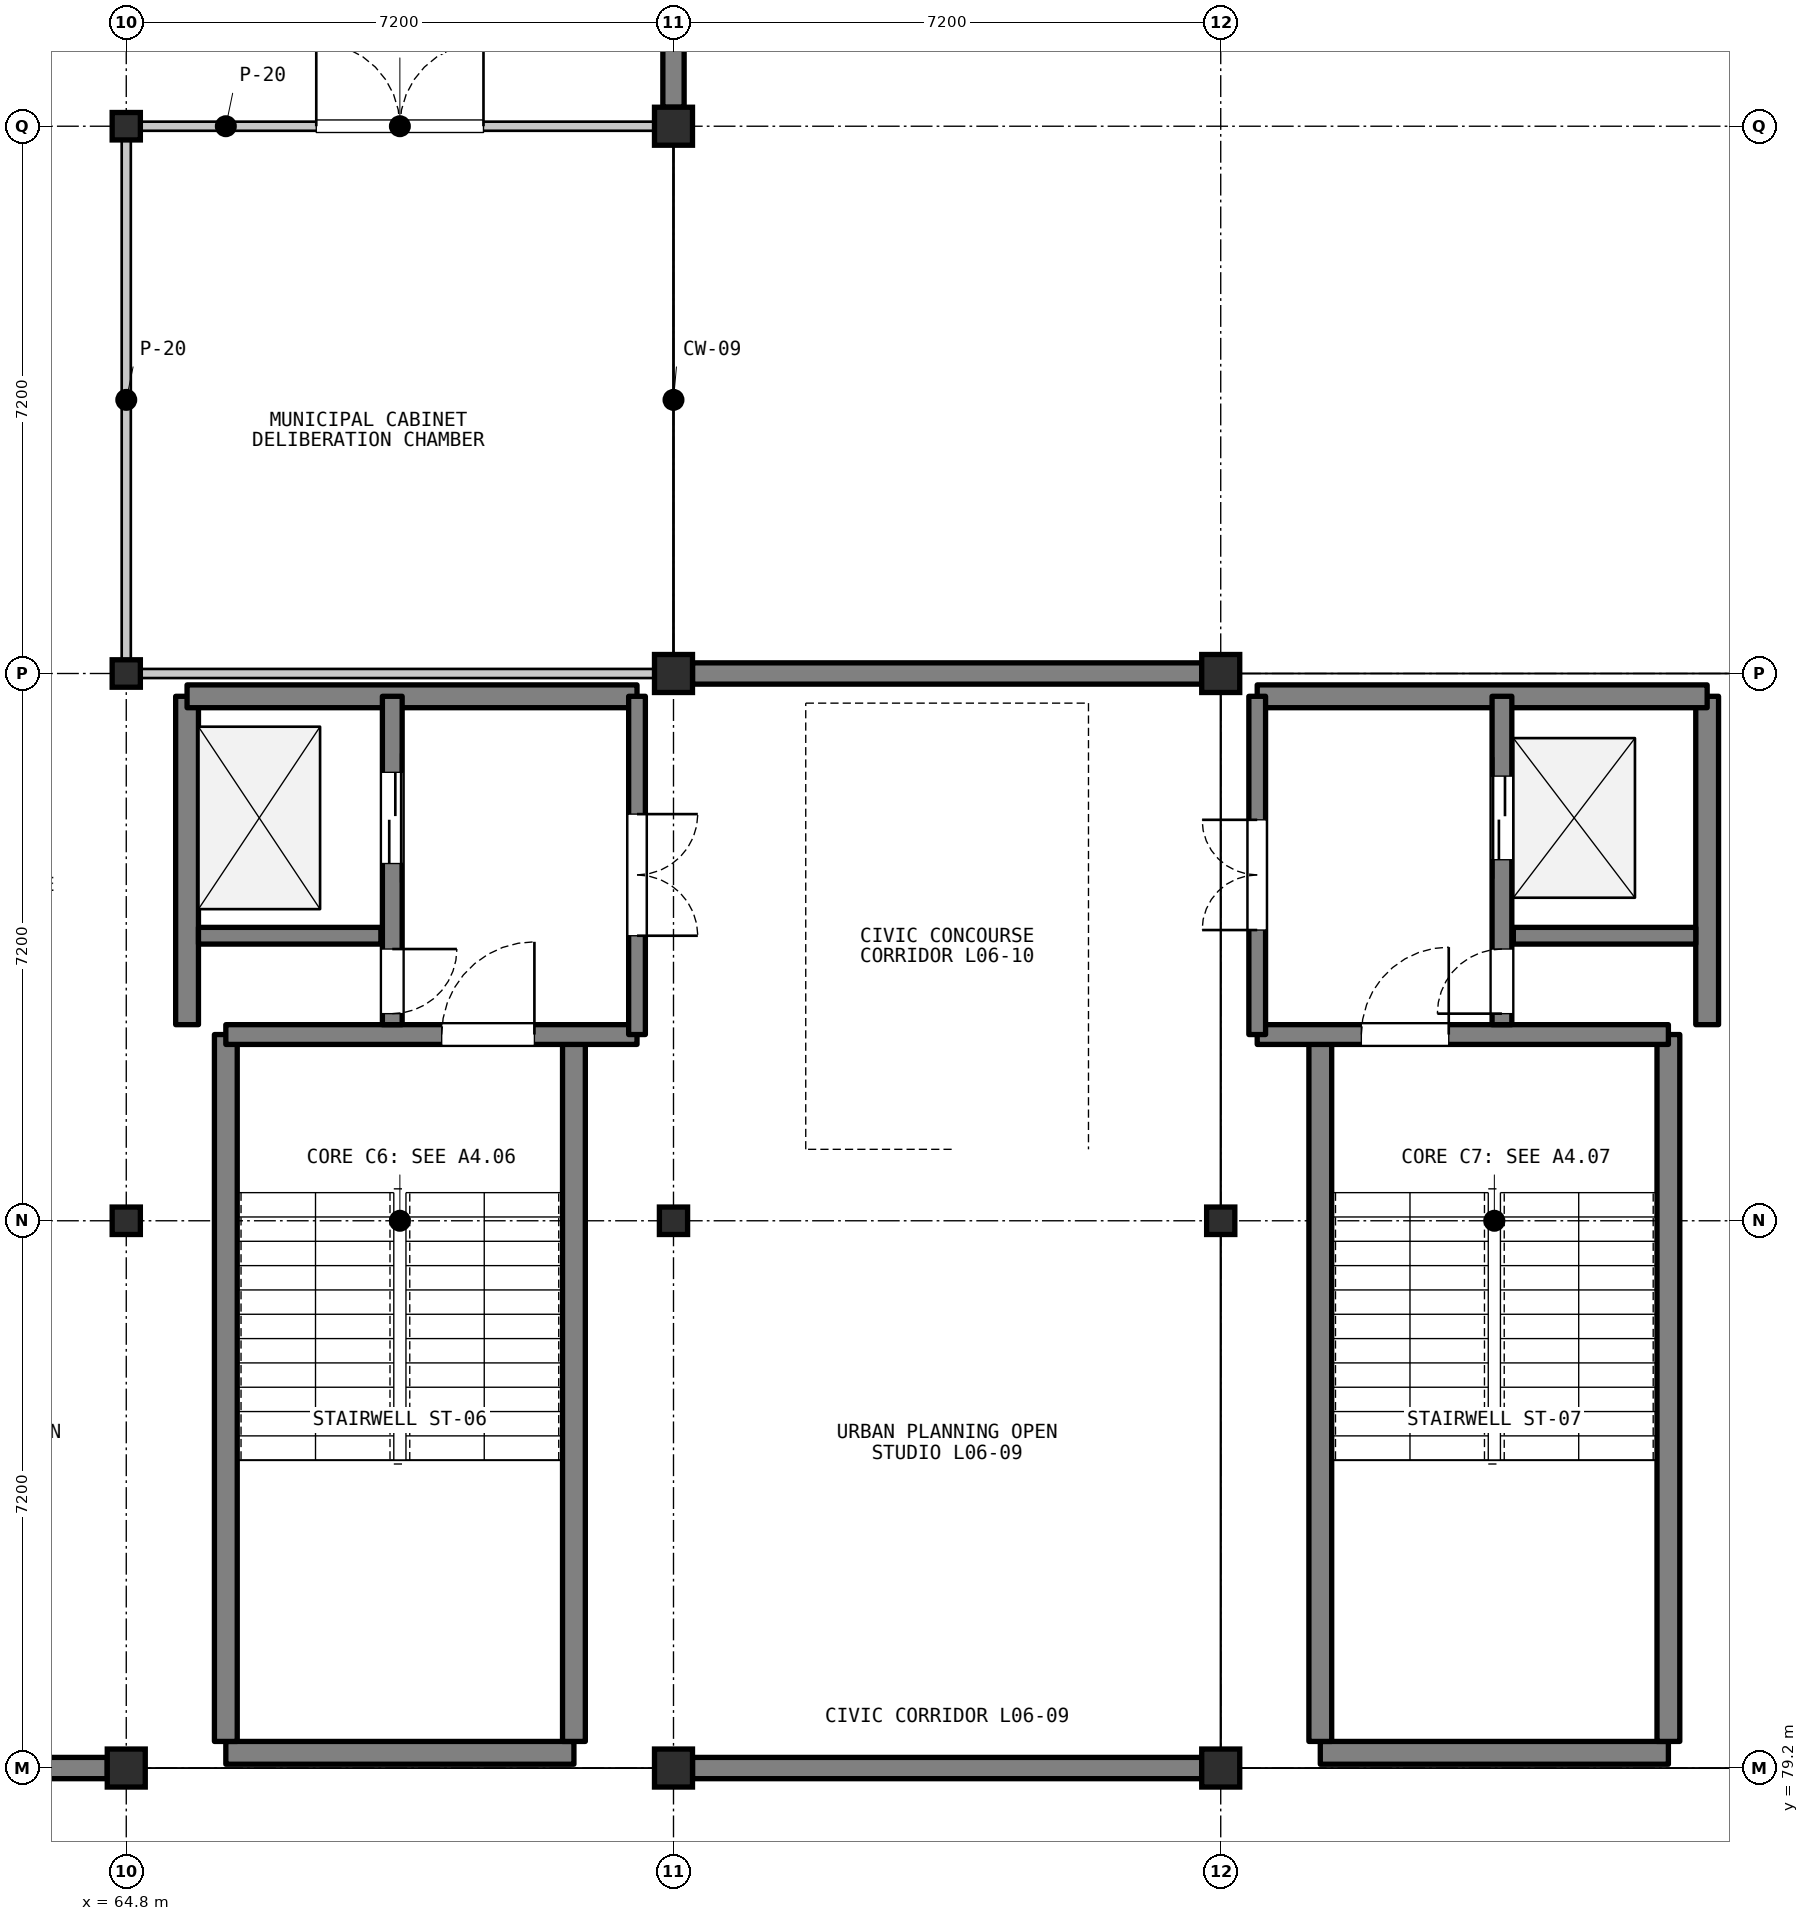
"""IFC4 building model, lengths in metres.
Left out: names, types, materials, properties, quantities, classifications, styles, units other than length and angle.
Written with IfcOpenShell. Run it as: python <this file> out.ifc"""

import sys

from ifc_helpers import new_model, si_unit, direction, frame, frame_2d, origin, origin_2d, place, context, subcontext, project, spatial, rectangle, i_section, extrude, element, fill, save


model = new_model("IFC4")
c1 = context("Model", 3, precision=1e-05, world=origin(), true_north=direction((0.0, 1.0)))
c2 = subcontext(c1, "Body", "Model", "MODEL_VIEW")
j1 = project(units=[si_unit("LENGTHUNIT", "METRE"), si_unit("PLANEANGLEUNIT", "RADIAN")], contexts=[c1])
p1 = place(None, origin())
s1 = spatial("IfcSite", under=j1, at=p1, CompositionType="ELEMENT")
p2 = place(p1, origin())
s2 = spatial("IfcBuilding", under=s1, at=p2, CompositionType="ELEMENT")
p3 = place(p2, frame((0.0, 0.0, 21.9)))
s3 = spatial("IfcBuildingStorey", under=s2, at=p3, CompositionType="ELEMENT", Elevation=21.9)
p4 = place(p3, frame((64.8, 79.2, 0.0), z_axis=(0.0, 0.0, 1.0), x_axis=(1.0, 0.0, 0.0)))
e1 = element("IfcColumn", 1, at=p4, inside=s3, PredefinedType="COLUMN", context=c2, shape_type="SweptSolid", body=[
    extrude(rectangle(XDim=0.5, YDim=0.5, at=origin_2d()), origin(), (0.0, 0.0, 1.0), 3.9),
])
for number, where, z_axis, x_axis in (
    (2, (64.8, 86.4, 0.0), (0.0, 0.0, 1.0), (1.0, 0.0, 0.0)),
    (3, (64.8, 93.6, 0.0), (0.0, 0.0, 1.0), (1.0, 0.0, 0.0)),
    (4, (64.8, 100.8, 0.0), (0.0, 0.0, 1.0), (1.0, 0.0, 0.0)),
):
    element("IfcColumn", number, at=place(p3, frame(where, z_axis=z_axis, x_axis=x_axis)), inside=s3, PredefinedType="COLUMN", context=c2, shape_type="SweptSolid", body=[
        extrude(i_section(OverallWidth=0.371, OverallDepth=0.361, WebThickness=0.012, FlangeThickness=0.02, FilletRadius=0.015, at=origin_2d()), origin(), (0.0, 0.0, 1.0), 3.9),
    ])
p5 = place(p3, frame((72.0, 79.2, 0.0), z_axis=(0.0, 0.0, 1.0), x_axis=(1.0, 0.0, 0.0)))
e5 = element("IfcColumn", 5, at=p5, inside=s3, PredefinedType="COLUMN", context=c2, shape_type="SweptSolid", body=[
    extrude(rectangle(XDim=0.5, YDim=0.5, at=origin_2d()), origin(), (0.0, 0.0, 1.0), 3.9),
])
p6 = place(p3, frame((72.0, 86.4, 0.0), z_axis=(0.0, 0.0, 1.0), x_axis=(1.0, 0.0, 0.0)))
e6 = element("IfcColumn", 6, at=p6, inside=s3, PredefinedType="COLUMN", context=c2, shape_type="SweptSolid", body=[
    extrude(i_section(OverallWidth=0.371, OverallDepth=0.361, WebThickness=0.012, FlangeThickness=0.02, FilletRadius=0.015, at=origin_2d()), origin(), (0.0, 0.0, 1.0), 3.9),
])
for number, where, z_axis, x_axis in (
    (7, (72.0, 93.6, 0.0), (0.0, 0.0, 1.0), (1.0, 0.0, 0.0)),
    (8, (72.0, 100.8, 0.0), (0.0, 0.0, 1.0), (1.0, 0.0, 0.0)),
    (9, (79.2, 79.2, 0.0), (0.0, 0.0, 1.0), (1.0, 0.0, 0.0)),
):
    element("IfcColumn", number, at=place(p3, frame(where, z_axis=z_axis, x_axis=x_axis)), inside=s3, PredefinedType="COLUMN", context=c2, shape_type="SweptSolid", body=[
        extrude(rectangle(XDim=0.5, YDim=0.5, at=origin_2d()), origin(), (0.0, 0.0, 1.0), 3.9),
    ])
p7 = place(p3, frame((79.2, 86.4, 0.0), z_axis=(0.0, 0.0, 1.0), x_axis=(1.0, 0.0, 0.0)))
e10 = element("IfcColumn", 10, at=p7, inside=s3, PredefinedType="COLUMN", context=c2, shape_type="SweptSolid", body=[
    extrude(i_section(OverallWidth=0.371, OverallDepth=0.361, WebThickness=0.012, FlangeThickness=0.02, FilletRadius=0.015, at=origin_2d()), origin(), (0.0, 0.0, 1.0), 3.9),
])
p8 = place(p3, frame((79.2, 93.6, 0.0), z_axis=(0.0, 0.0, 1.0), x_axis=(1.0, 0.0, 0.0)))
e11 = element("IfcColumn", 11, at=p8, inside=s3, PredefinedType="COLUMN", context=c2, shape_type="SweptSolid", body=[
    extrude(rectangle(XDim=0.5, YDim=0.5, at=origin_2d()), origin(), (0.0, 0.0, 1.0), 3.9),
])
for number, where, z_axis, x_axis in (
    (12, (64.55, 79.2, 0.0), (0.0, 0.0, 1.0), (-1.0, 0.0, 0.0)),
    (13, (72.0, 107.75, 0.0), (0.0, 0.0, 1.0), (0.0, -1.0, 0.0)),
    (14, (78.95, 79.2, 0.0), (0.0, 0.0, 1.0), (-1.0, 0.0, 0.0)),
    (15, (72.25, 93.6, 0.0), (0.0, 0.0, 1.0), (1.0, 0.0, 0.0)),
):
    element("IfcWall", number, at=place(p3, frame(where, z_axis=z_axis, x_axis=x_axis)), inside=s3, PredefinedType="SOLIDWALL", context=c2, shape_type="SweptSolid", body=[
        extrude(rectangle(XDim=6.7, YDim=0.28, at=frame_2d((3.35, 0.0))), origin(), (0.0, 0.0, 1.0), 3.192),
    ])
p9 = place(p3, frame((66.11, 79.4, 0.0), z_axis=(0.0, 0.0, 1.0), x_axis=(1.0, 0.0, 0.0)))
e16 = element("IfcWall", 16, at=p9, inside=s3, PredefinedType="SHEAR", context=c2, shape_type="SweptSolid", body=[
    extrude(rectangle(XDim=4.58, YDim=0.3, at=frame_2d((2.29, 0.0))), origin(), (0.0, 0.0, 1.0), 3.72),
])
for number, where, z_axis, x_axis in (
    (17, (66.11, 79.55, 0.0), (0.0, 0.0, 1.0), (0.0, 1.0, 0.0)),
    (18, (70.69, 79.55, 0.0), (0.0, 0.0, 1.0), (0.0, 1.0, 0.0)),
):
    element("IfcWall", number, at=place(p3, frame(where, z_axis=z_axis, x_axis=x_axis)), inside=s3, PredefinedType="SHEAR", context=c2, shape_type="SweptSolid", body=[
        extrude(rectangle(XDim=9.3, YDim=0.3, at=frame_2d((4.65, 0.0))), origin(), (0.0, 0.0, 1.0), 3.72),
    ])
p10 = place(p3, frame((66.11, 88.85, 0.0), z_axis=(0.0, 0.0, 1.0), x_axis=(1.0, 0.0, 0.0)))
e19 = element("IfcWall", 19, at=p10, inside=s3, PredefinedType="SHEAR", context=c2, shape_type="SweptSolid", body=[
    extrude(rectangle(XDim=5.41, YDim=0.26, at=frame_2d((2.705, 0.0))), origin(), (0.0, 0.0, 1.0), 3.72),
])
p11 = place(p10, frame((2.84, 0.0, 0.0)))
e20 = element("IfcOpeningElement", 20, at=p11, cuts=e19, PredefinedType="OPENING", context=c2, shape_type="SweptSolid", body=[
    extrude(rectangle(XDim=1.22, YDim=2.15, at=frame_2d((0.61, 1.075))), frame((0.0, 0.14, 0.0), z_axis=(0.0, -1.0, 0.0), x_axis=(1.0, 0.0, 0.0)), (0.0, 0.0, 1.0), 0.28),
])
p12 = place(p3, frame((65.6, 88.98, 0.0), z_axis=(0.0, 0.0, 1.0), x_axis=(0.0, 1.0, 0.0)))
e21 = element("IfcWall", 21, at=p12, inside=s3, PredefinedType="SHEAR", context=c2, shape_type="SweptSolid", body=[
    extrude(rectangle(XDim=4.32, YDim=0.3, at=frame_2d((2.16, 0.0))), origin(), (0.0, 0.0, 1.0), 3.72),
])
p13 = place(p3, frame((65.6, 93.3, 0.0), z_axis=(0.0, 0.0, 1.0), x_axis=(1.0, 0.0, 0.0)))
e22 = element("IfcWall", 22, at=p13, inside=s3, PredefinedType="SHEAR", context=c2, shape_type="SweptSolid", body=[
    extrude(rectangle(XDim=5.92, YDim=0.3, at=frame_2d((2.96, 0.0))), origin(), (0.0, 0.0, 1.0), 3.72),
])
p14 = place(p3, frame((65.75, 90.15, 0.0), z_axis=(0.0, 0.0, 1.0), x_axis=(1.0, 0.0, 0.0)))
e23 = element("IfcWall", 23, at=p14, inside=s3, PredefinedType="SHEAR", context=c2, shape_type="SweptSolid", body=[
    extrude(rectangle(XDim=2.4, YDim=0.22, at=frame_2d((1.2, 0.0))), origin(), (0.0, 0.0, 1.0), 3.72),
])
p15 = place(p3, frame((68.3, 93.3, 0.0), z_axis=(0.0, 0.0, 1.0), x_axis=(0.0, -1.0, 0.0)))
e24 = element("IfcWall", 24, at=p15, inside=s3, PredefinedType="SHEAR", context=c2, shape_type="SweptSolid", body=[
    extrude(rectangle(XDim=4.32, YDim=0.26, at=frame_2d((2.16, 0.0))), origin(), (0.0, 0.0, 1.0), 3.72),
])
p16 = place(p15, frame((1.0, 0.0, 0.0)))
e25 = element("IfcOpeningElement", 25, at=p16, cuts=e24, PredefinedType="OPENING", context=c2, shape_type="SweptSolid", body=[
    extrude(rectangle(XDim=1.2, YDim=2.15, at=frame_2d((0.6, 1.075))), frame((0.0, 0.14, 0.0), z_axis=(0.0, -1.0, 0.0), x_axis=(1.0, 0.0, 0.0)), (0.0, 0.0, 1.0), 0.28),
])
p17 = place(p15, frame((3.325, 0.0, 0.0)))
e26 = element("IfcOpeningElement", 26, at=p17, cuts=e24, PredefinedType="OPENING", context=c2, shape_type="SweptSolid", body=[
    extrude(rectangle(XDim=0.85, YDim=2.05, at=frame_2d((0.425, 1.025))), frame((0.0, 0.14, 0.0), z_axis=(0.0, -1.0, 0.0), x_axis=(1.0, 0.0, 0.0)), (0.0, 0.0, 1.0), 0.28),
])
p18 = place(p3, frame((71.52, 93.3, 0.0), z_axis=(0.0, 0.0, 1.0), x_axis=(0.0, -1.0, 0.0)))
e27 = element("IfcWall", 27, at=p18, inside=s3, PredefinedType="SHEAR", context=c2, shape_type="SweptSolid", body=[
    extrude(rectangle(XDim=4.45, YDim=0.22, at=frame_2d((2.225, 0.0))), origin(), (0.0, 0.0, 1.0), 3.72),
])
p19 = place(p18, frame((1.55, 0.0, 0.0)))
e28 = element("IfcOpeningElement", 28, at=p19, cuts=e27, PredefinedType="OPENING", context=c2, shape_type="SweptSolid", body=[
    extrude(rectangle(XDim=1.6, YDim=2.2, at=frame_2d((0.8, 1.1))), frame((0.0, 0.12, 0.0), z_axis=(0.0, -1.0, 0.0), x_axis=(1.0, 0.0, 0.0)), (0.0, 0.0, 1.0), 0.24),
])
p20 = place(p3, frame((80.51, 79.4, 0.0), z_axis=(0.0, 0.0, 1.0), x_axis=(1.0, 0.0, 0.0)))
e29 = element("IfcWall", 29, at=p20, inside=s3, PredefinedType="SHEAR", context=c2, shape_type="SweptSolid", body=[
    extrude(rectangle(XDim=4.58, YDim=0.3, at=frame_2d((2.29, 0.0))), origin(), (0.0, 0.0, 1.0), 3.72),
])
for number, where, z_axis, x_axis in (
    (30, (80.51, 79.55, 0.0), (0.0, 0.0, 1.0), (0.0, 1.0, 0.0)),
    (31, (85.09, 79.55, 0.0), (0.0, 0.0, 1.0), (0.0, 1.0, 0.0)),
):
    element("IfcWall", number, at=place(p3, frame(where, z_axis=z_axis, x_axis=x_axis)), inside=s3, PredefinedType="SHEAR", context=c2, shape_type="SweptSolid", body=[
        extrude(rectangle(XDim=9.3, YDim=0.3, at=frame_2d((4.65, 0.0))), origin(), (0.0, 0.0, 1.0), 3.72),
    ])
p21 = place(p3, frame((79.68, 88.85, 0.0), z_axis=(0.0, 0.0, 1.0), x_axis=(1.0, 0.0, 0.0)))
e32 = element("IfcWall", 32, at=p21, inside=s3, PredefinedType="SHEAR", context=c2, shape_type="SweptSolid", body=[
    extrude(rectangle(XDim=5.41, YDim=0.26, at=frame_2d((2.705, 0.0))), origin(), (0.0, 0.0, 1.0), 3.72),
])
p22 = place(p21, frame((1.37, 0.0, 0.0)))
e33 = element("IfcOpeningElement", 33, at=p22, cuts=e32, PredefinedType="OPENING", context=c2, shape_type="SweptSolid", body=[
    extrude(rectangle(XDim=1.15, YDim=2.15, at=frame_2d((0.575, 1.075))), frame((0.0, 0.14, 0.0), z_axis=(0.0, -1.0, 0.0), x_axis=(1.0, 0.0, 0.0)), (0.0, 0.0, 1.0), 0.28),
])
p23 = place(p3, frame((85.6, 88.98, 0.0), z_axis=(0.0, 0.0, 1.0), x_axis=(0.0, 1.0, 0.0)))
e34 = element("IfcWall", 34, at=p23, inside=s3, PredefinedType="SHEAR", context=c2, shape_type="SweptSolid", body=[
    extrude(rectangle(XDim=4.32, YDim=0.3, at=frame_2d((2.16, 0.0))), origin(), (0.0, 0.0, 1.0), 3.72),
])
p24 = place(p3, frame((79.68, 93.3, 0.0), z_axis=(0.0, 0.0, 1.0), x_axis=(1.0, 0.0, 0.0)))
e35 = element("IfcWall", 35, at=p24, inside=s3, PredefinedType="SHEAR", context=c2, shape_type="SweptSolid", body=[
    extrude(rectangle(XDim=5.92, YDim=0.3, at=frame_2d((2.96, 0.0))), origin(), (0.0, 0.0, 1.0), 3.72),
])
p25 = place(p3, frame((83.05, 90.15, 0.0), z_axis=(0.0, 0.0, 1.0), x_axis=(1.0, 0.0, 0.0)))
e36 = element("IfcWall", 36, at=p25, inside=s3, PredefinedType="SHEAR", context=c2, shape_type="SweptSolid", body=[
    extrude(rectangle(XDim=2.4, YDim=0.22, at=frame_2d((1.2, 0.0))), origin(), (0.0, 0.0, 1.0), 3.72),
])
p26 = place(p3, frame((82.9, 88.98, 0.0), z_axis=(0.0, 0.0, 1.0), x_axis=(0.0, 1.0, 0.0)))
e37 = element("IfcWall", 37, at=p26, inside=s3, PredefinedType="SHEAR", context=c2, shape_type="SweptSolid", body=[
    extrude(rectangle(XDim=4.32, YDim=0.26, at=frame_2d((2.16, 0.0))), origin(), (0.0, 0.0, 1.0), 3.72),
])
p27 = place(p26, frame((2.17, 0.0, 0.0)))
e38 = element("IfcOpeningElement", 38, at=p27, cuts=e37, PredefinedType="OPENING", context=c2, shape_type="SweptSolid", body=[
    extrude(rectangle(XDim=1.1, YDim=2.15, at=frame_2d((0.55, 1.075))), frame((0.0, 0.14, 0.0), z_axis=(0.0, -1.0, 0.0), x_axis=(1.0, 0.0, 0.0)), (0.0, 0.0, 1.0), 0.28),
])
p28 = place(p26, frame((0.145, 0.0, 0.0)))
e39 = element("IfcOpeningElement", 39, at=p28, cuts=e37, PredefinedType="OPENING", context=c2, shape_type="SweptSolid", body=[
    extrude(rectangle(XDim=0.85, YDim=2.05, at=frame_2d((0.425, 1.025))), frame((0.0, 0.14, 0.0), z_axis=(0.0, -1.0, 0.0), x_axis=(1.0, 0.0, 0.0)), (0.0, 0.0, 1.0), 0.28),
])
p29 = place(p3, frame((79.68, 88.85, 0.0), z_axis=(0.0, 0.0, 1.0), x_axis=(0.0, 1.0, 0.0)))
e40 = element("IfcWall", 40, at=p29, inside=s3, PredefinedType="SHEAR", context=c2, shape_type="SweptSolid", body=[
    extrude(rectangle(XDim=4.45, YDim=0.22, at=frame_2d((2.225, 0.0))), origin(), (0.0, 0.0, 1.0), 3.72),
])
p30 = place(p29, frame((1.375, 0.0, 0.0)))
e41 = element("IfcOpeningElement", 41, at=p30, cuts=e40, PredefinedType="OPENING", context=c2, shape_type="SweptSolid", body=[
    extrude(rectangle(XDim=1.45, YDim=2.2, at=frame_2d((0.725, 1.1))), frame((0.0, 0.12, 0.0), z_axis=(0.0, -1.0, 0.0), x_axis=(1.0, 0.0, 0.0)), (0.0, 0.0, 1.0), 0.24),
])
p31 = place(p3, frame((64.92, 100.8, 0.0), z_axis=(0.0, 0.0, 1.0), x_axis=(1.0, 0.0, 0.0)))
e42 = element("IfcWall", 42, at=p31, inside=s3, PredefinedType="PARTITIONING", context=c2, shape_type="SweptSolid", body=[
    extrude(rectangle(XDim=6.96, YDim=0.12, at=frame_2d((3.48, 0.0))), origin(), (0.0, 0.0, 1.0), 3.108),
])
p32 = place(p31, frame((2.38, 0.0, 0.0)))
e43 = element("IfcOpeningElement", 43, at=p32, cuts=e42, PredefinedType="OPENING", context=c2, shape_type="SweptSolid", body=[
    extrude(rectangle(XDim=2.2, YDim=2.6, at=frame_2d((1.1, 1.3))), frame((0.0, 0.07, 0.0), z_axis=(0.0, -1.0, 0.0), x_axis=(1.0, 0.0, 0.0)), (0.0, 0.0, 1.0), 0.14),
])
for number, where, z_axis, x_axis in (
    (44, (71.88, 93.6, 0.0), (0.0, 0.0, 1.0), (-1.0, 0.0, 0.0)),
    (45, (64.8, 93.72, 0.0), (0.0, 0.0, 1.0), (0.0, 1.0, 0.0)),
):
    element("IfcWall", number, at=place(p3, frame(where, z_axis=z_axis, x_axis=x_axis)), inside=s3, PredefinedType="PARTITIONING", context=c2, shape_type="SweptSolid", body=[
        extrude(rectangle(XDim=6.96, YDim=0.12, at=frame_2d((3.48, 0.0))), origin(), (0.0, 0.0, 1.0), 3.108),
    ])
p33 = place(p11, origin())
e46 = element("IfcDoor", 46, at=p33, inside=s3, OperationType="SINGLE_SWING_RIGHT", PredefinedType="DOOR", context=c2, shape_type="SweptSolid", body=[
    extrude(rectangle(XDim=1.22, YDim=2.15, at=frame_2d((0.61, 1.075))), frame((0.0, 0.025, 0.0), z_axis=(0.0, -1.0, 0.0), x_axis=(1.0, 0.0, 0.0)), (0.0, 0.0, 1.0), 0.05),
])
fill(e20, e46)
p34 = place(p16, origin())
e47 = element("IfcDoor", 47, at=p34, inside=s3, OperationType="DOUBLE_DOOR_SLIDING", PredefinedType="DOOR", context=c2, shape_type="SweptSolid", body=[
    extrude(rectangle(XDim=1.2, YDim=2.15, at=frame_2d((0.6, 1.075))), frame((0.0, 0.025, 0.0), z_axis=(0.0, -1.0, 0.0), x_axis=(1.0, 0.0, 0.0)), (0.0, 0.0, 1.0), 0.05),
])
fill(e25, e47)
p35 = place(p17, origin())
e48 = element("IfcDoor", 48, at=p35, inside=s3, OperationType="SINGLE_SWING_LEFT", PredefinedType="DOOR", context=c2, shape_type="SweptSolid", body=[
    extrude(rectangle(XDim=0.85, YDim=2.05, at=frame_2d((0.425, 1.025))), frame((0.0, 0.025, 0.0), z_axis=(0.0, -1.0, 0.0), x_axis=(1.0, 0.0, 0.0)), (0.0, 0.0, 1.0), 0.05),
])
fill(e26, e48)
p36 = place(p19, origin())
e49 = element("IfcDoor", 49, at=p36, inside=s3, OperationType="DOUBLE_DOOR_SINGLE_SWING", PredefinedType="DOOR", context=c2, shape_type="SweptSolid", body=[
    extrude(rectangle(XDim=1.6, YDim=2.2, at=frame_2d((0.8, 1.1))), frame((0.0, 0.025, 0.0), z_axis=(0.0, -1.0, 0.0), x_axis=(1.0, 0.0, 0.0)), (0.0, 0.0, 1.0), 0.05),
])
fill(e28, e49)
p37 = place(p22, origin())
e50 = element("IfcDoor", 50, at=p37, inside=s3, OperationType="SINGLE_SWING_RIGHT", PredefinedType="DOOR", context=c2, shape_type="SweptSolid", body=[
    extrude(rectangle(XDim=1.15, YDim=2.15, at=frame_2d((0.575, 1.075))), frame((0.0, 0.025, 0.0), z_axis=(0.0, -1.0, 0.0), x_axis=(1.0, 0.0, 0.0)), (0.0, 0.0, 1.0), 0.05),
])
fill(e33, e50)
p38 = place(p27, origin())
e51 = element("IfcDoor", 51, at=p38, inside=s3, OperationType="DOUBLE_DOOR_SLIDING", PredefinedType="DOOR", context=c2, shape_type="SweptSolid", body=[
    extrude(rectangle(XDim=1.1, YDim=2.15, at=frame_2d((0.55, 1.075))), frame((0.0, 0.025, 0.0), z_axis=(0.0, -1.0, 0.0), x_axis=(1.0, 0.0, 0.0)), (0.0, 0.0, 1.0), 0.05),
])
fill(e38, e51)
p39 = place(p28, origin())
e52 = element("IfcDoor", 52, at=p39, inside=s3, OperationType="SINGLE_SWING_LEFT", PredefinedType="DOOR", context=c2, shape_type="SweptSolid", body=[
    extrude(rectangle(XDim=0.85, YDim=2.05, at=frame_2d((0.425, 1.025))), frame((0.0, 0.025, 0.0), z_axis=(0.0, -1.0, 0.0), x_axis=(1.0, 0.0, 0.0)), (0.0, 0.0, 1.0), 0.05),
])
fill(e39, e52)
p40 = place(p30, origin())
e53 = element("IfcDoor", 53, at=p40, inside=s3, OperationType="DOUBLE_DOOR_SINGLE_SWING", PredefinedType="DOOR", context=c2, shape_type="SweptSolid", body=[
    extrude(rectangle(XDim=1.45, YDim=2.2, at=frame_2d((0.725, 1.1))), frame((0.0, 0.025, 0.0), z_axis=(0.0, -1.0, 0.0), x_axis=(1.0, 0.0, 0.0)), (0.0, 0.0, 1.0), 0.05),
])
fill(e41, e53)
p41 = place(p32, origin())
e54 = element("IfcDoor", 54, at=p41, inside=s3, OperationType="DOUBLE_DOOR_SINGLE_SWING", PredefinedType="DOOR", context=c2, shape_type="SweptSolid", body=[
    extrude(rectangle(XDim=2.2, YDim=2.6, at=frame_2d((1.1, 1.3))), frame((0.0, 0.025, 0.0), z_axis=(0.0, -1.0, 0.0), x_axis=(1.0, 0.0, 0.0)), (0.0, 0.0, 1.0), 0.05),
])
fill(e43, e54)
save(model, sys.argv[1])
